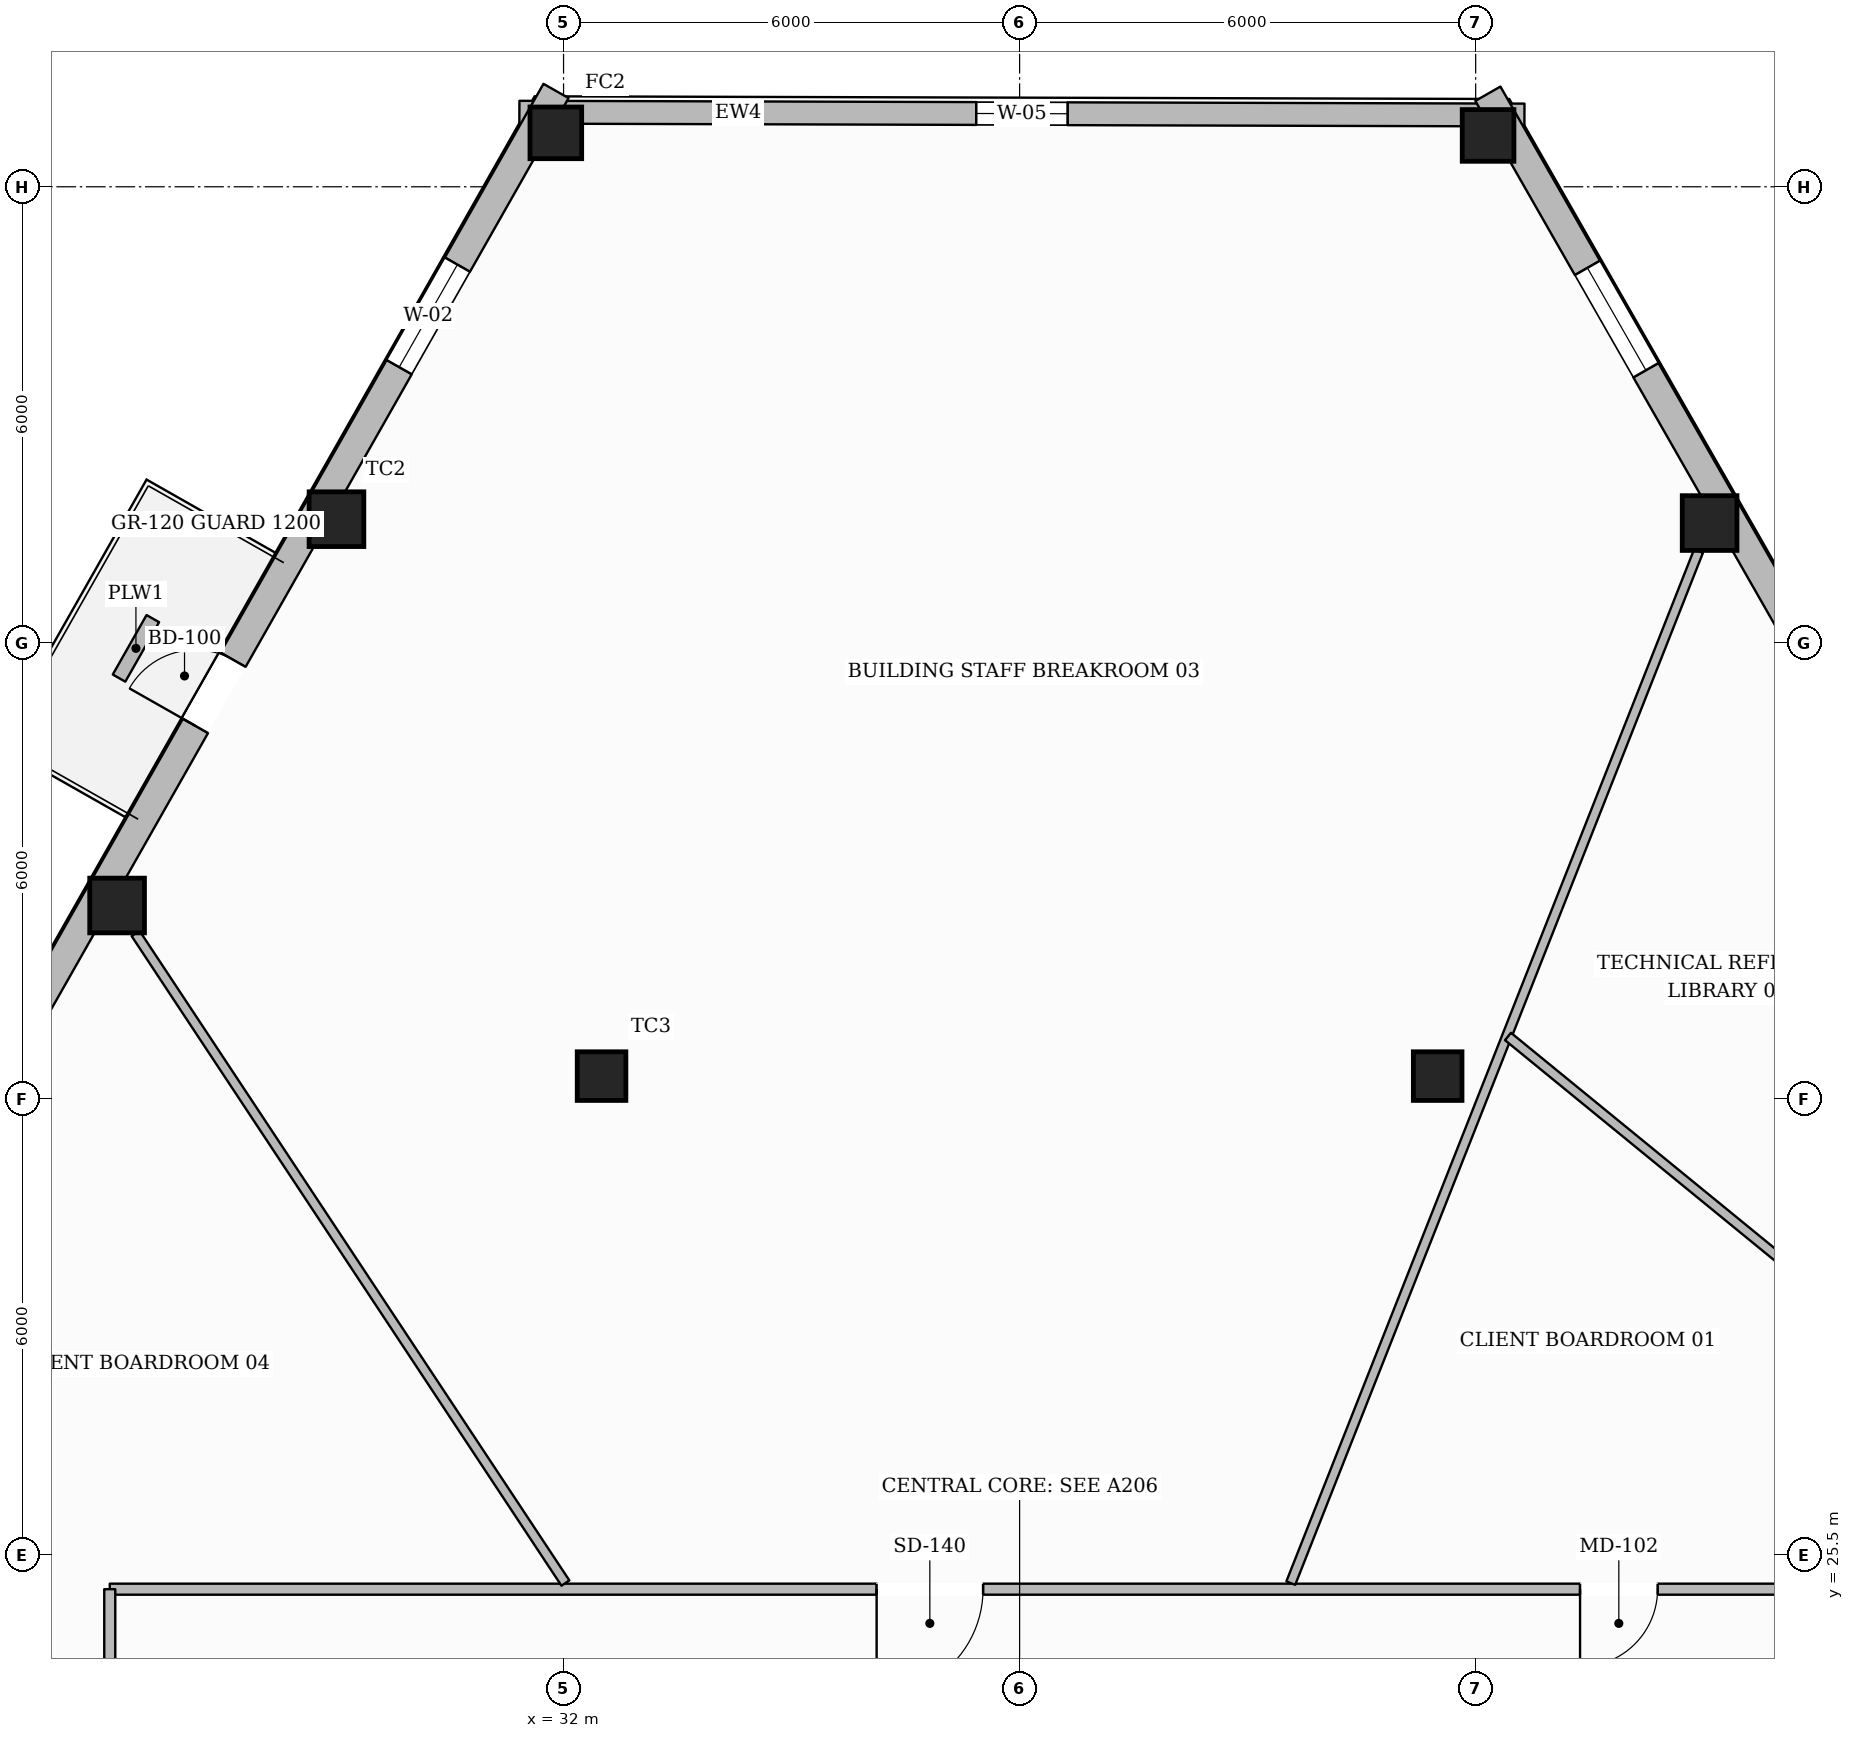
"""IFC4 building model, lengths in metres.
Left out: names, types, materials, properties, quantities, classifications, styles, units other than length and angle.
Written with IfcOpenShell. Run it as: python <this file> out.ifc"""

import sys

from ifc_helpers import new_model, si_unit, direction, frame, frame_2d, origin, origin_2d, place, context, subcontext, project, spatial, rectangle, hollow_rectangle, extrude, element, fill, save


model = new_model("IFC4")
c1 = context("Model", 3, precision=1e-05, world=origin(), true_north=direction((0.0, 1.0)))
c2 = subcontext(c1, "Body", "Model", "MODEL_VIEW")
j1 = project(units=[si_unit("LENGTHUNIT", "METRE"), si_unit("PLANEANGLEUNIT", "RADIAN")], contexts=[c1])
p1 = place(None, origin())
s1 = spatial("IfcSite", under=j1, at=p1, CompositionType="ELEMENT")
p2 = place(p1, origin())
s2 = spatial("IfcBuilding", under=s1, at=p2, CompositionType="ELEMENT")
p3 = place(p2, frame((0.0, 0.0, 97.05)))
s3 = spatial("IfcBuildingStorey", under=s2, at=p3, CompositionType="ELEMENT", Elevation=97.05)
p4 = place(p3, frame((31.899, 44.209, 0.0), z_axis=(0.0, 0.0, 1.0), x_axis=(1.0, 0.0, 0.0)))
e1 = element("IfcColumn", 1, at=p4, inside=s3, PredefinedType="COLUMN", context=c2, shape_type="SweptSolid", body=[
    extrude(hollow_rectangle(XDim=0.68, YDim=0.68, WallThickness=0.03, at=origin_2d()), origin(), (0.0, 0.0, 1.0), 3.6),
])
for number, where, z_axis, x_axis in (
    (2, (29.012, 39.127, 0.0), (0.0, 0.0, 1.0), (1.0, 0.0, 0.0)),
    (3, (26.126, 34.044, 0.0), (0.0, 0.0, 1.0), (1.0, 0.0, 0.0)),
    (4, (47.078, 39.076, 0.0), (0.0, 0.0, 1.0), (1.0, 0.0, 0.0)),
):
    element("IfcColumn", number, at=place(p3, frame(where, z_axis=z_axis, x_axis=x_axis)), inside=s3, PredefinedType="COLUMN", context=c2, shape_type="SweptSolid", body=[
        extrude(hollow_rectangle(XDim=0.72, YDim=0.72, WallThickness=0.032, at=origin_2d()), origin(), (0.0, 0.0, 1.0), 3.6),
    ])
p5 = place(p3, frame((44.163, 44.175, 0.0), z_axis=(0.0, 0.0, 1.0), x_axis=(1.0, 0.0, 0.0)))
e5 = element("IfcColumn", 5, at=p5, inside=s3, PredefinedType="COLUMN", context=c2, shape_type="SweptSolid", body=[
    extrude(hollow_rectangle(XDim=0.68, YDim=0.68, WallThickness=0.03, at=origin_2d()), origin(), (0.0, 0.0, 1.0), 3.6),
])
for number, where, z_axis, x_axis in (
    (6, (32.5, 31.8, 0.0), (0.0, 0.0, 1.0), (1.0, 0.0, 0.0)),
    (7, (43.5, 31.8, 0.0), (0.0, 0.0, 1.0), (1.0, 0.0, 0.0)),
):
    element("IfcColumn", number, at=place(p3, frame(where, z_axis=z_axis, x_axis=x_axis)), inside=s3, PredefinedType="COLUMN", context=c2, shape_type="SweptSolid", body=[
        extrude(hollow_rectangle(XDim=0.64, YDim=0.64, WallThickness=0.028, at=origin_2d()), origin(), (0.0, 0.0, 1.0), 3.6),
    ])
p6 = place(p3, frame((31.419, 44.481, 0.0), z_axis=(0.0, 0.0, 1.0), x_axis=(0.999996113452, -0.002788024615, 0.0)))
e8 = element("IfcWall", 8, at=p6, inside=s3, PredefinedType="STANDARD", context=c2, shape_type="SweptSolid", body=[
    extrude(rectangle(XDim=13.223, YDim=0.3, at=frame_2d((6.611, 0.0))), origin(), (0.0, 0.0, 1.0), 3.059),
])
p7 = place(p6, frame((6.011, 0.0, 0.65)))
e9 = element("IfcOpeningElement", 9, at=p7, cuts=e8, PredefinedType="OPENING", context=c2, shape_type="SweptSolid", body=[
    extrude(rectangle(XDim=1.2, YDim=1.7, at=frame_2d((0.6, 0.85))), frame((0.0, 0.16, 0.0), z_axis=(0.0, -1.0, 0.0), x_axis=(1.0, 0.0, 0.0)), (0.0, 0.0, 1.0), 0.32),
])
p8 = place(p3, frame((14.113, 13.436, 0.0), z_axis=(0.0, 0.0, 1.0), x_axis=(0.493785476093, 0.869583753068, 0.0)))
e10 = element("IfcWall", 10, at=p8, inside=s3, PredefinedType="STANDARD", context=c2, shape_type="SweptSolid", body=[
    extrude(rectangle(XDim=36.023, YDim=0.38, at=frame_2d((18.011, 0.0))), origin(), (0.0, 0.0, 1.0), 3.059),
])
p9 = place(p8, frame((26.417, 0.0, 0.0)))
e11 = element("IfcOpeningElement", 11, at=p9, cuts=e10, PredefinedType="OPENING", context=c2, shape_type="SweptSolid", body=[
    extrude(rectangle(XDim=1.0, YDim=2.2, at=frame_2d((0.5, 1.1))), frame((0.0, 0.2, 0.0), z_axis=(0.0, -1.0, 0.0), x_axis=(1.0, 0.0, 0.0)), (0.0, 0.0, 1.0), 0.4),
])
p10 = place(p8, frame((31.845, 0.0, 0.65)))
e12 = element("IfcOpeningElement", 12, at=p10, cuts=e10, PredefinedType="OPENING", context=c2, shape_type="SweptSolid", body=[
    extrude(rectangle(XDim=1.55, YDim=1.75, at=frame_2d((0.775, 0.875))), frame((0.0, 0.2, 0.0), z_axis=(0.0, -1.0, 0.0), x_axis=(1.0, 0.0, 0.0)), (0.0, 0.0, 1.0), 0.4),
])
p11 = place(p8, frame((20.156, 0.0, 0.65)))
e13 = element("IfcOpeningElement", 13, at=p11, cuts=e10, PredefinedType="OPENING", context=c2, shape_type="SweptSolid", body=[
    extrude(rectangle(XDim=1.55, YDim=1.75, at=frame_2d((0.775, 0.875))), frame((0.0, 0.2, 0.0), z_axis=(0.0, -1.0, 0.0), x_axis=(1.0, 0.0, 0.0)), (0.0, 0.0, 1.0), 0.4),
])
p12 = place(p8, frame((8.466, 0.0, 0.65)))
e14 = element("IfcOpeningElement", 14, at=p12, cuts=e10, PredefinedType="OPENING", context=c2, shape_type="SweptSolid", body=[
    extrude(rectangle(XDim=1.55, YDim=1.75, at=frame_2d((0.775, 0.875))), frame((0.0, 0.2, 0.0), z_axis=(0.0, -1.0, 0.0), x_axis=(1.0, 0.0, 0.0)), (0.0, 0.0, 1.0), 0.4),
])
p13 = place(p8, frame((2.621, 0.0, 0.65)))
e15 = element("IfcOpeningElement", 15, at=p13, cuts=e10, PredefinedType="OPENING", context=c2, shape_type="SweptSolid", body=[
    extrude(rectangle(XDim=1.55, YDim=1.75, at=frame_2d((0.775, 0.875))), frame((0.0, 0.2, 0.0), z_axis=(0.0, -1.0, 0.0), x_axis=(1.0, 0.0, 0.0)), (0.0, 0.0, 1.0), 0.4),
])
p14 = place(p3, frame((44.161, 44.724, 0.0), z_axis=(0.0, 0.0, 1.0), x_axis=(0.496205042728, -0.86820536486, 0.0)))
e16 = element("IfcWall", 16, at=p14, inside=s3, PredefinedType="STANDARD", context=c2, shape_type="SweptSolid", body=[
    extrude(rectangle(XDim=36.193, YDim=0.38, at=frame_2d((18.097, 0.0))), origin(), (0.0, 0.0, 1.0), 3.059),
])
p15 = place(p14, frame((32.008, 0.0, 0.65)))
e17 = element("IfcOpeningElement", 17, at=p15, cuts=e16, PredefinedType="OPENING", context=c2, shape_type="SweptSolid", body=[
    extrude(rectangle(XDim=1.55, YDim=1.75, at=frame_2d((0.775, 0.875))), frame((0.0, 0.2, 0.0), z_axis=(0.0, -1.0, 0.0), x_axis=(1.0, 0.0, 0.0)), (0.0, 0.0, 1.0), 0.4),
])
p16 = place(p14, frame((26.134, 0.0, 0.65)))
e18 = element("IfcOpeningElement", 18, at=p16, cuts=e16, PredefinedType="OPENING", context=c2, shape_type="SweptSolid", body=[
    extrude(rectangle(XDim=1.55, YDim=1.75, at=frame_2d((0.775, 0.875))), frame((0.0, 0.2, 0.0), z_axis=(0.0, -1.0, 0.0), x_axis=(1.0, 0.0, 0.0)), (0.0, 0.0, 1.0), 0.4),
])
p17 = place(p14, frame((20.26, 0.0, 0.65)))
e19 = element("IfcOpeningElement", 19, at=p17, cuts=e16, PredefinedType="OPENING", context=c2, shape_type="SweptSolid", body=[
    extrude(rectangle(XDim=1.55, YDim=1.75, at=frame_2d((0.775, 0.875))), frame((0.0, 0.2, 0.0), z_axis=(0.0, -1.0, 0.0), x_axis=(1.0, 0.0, 0.0)), (0.0, 0.0, 1.0), 0.4),
])
p18 = place(p14, frame((8.513, 0.0, 0.65)))
e20 = element("IfcOpeningElement", 20, at=p18, cuts=e16, PredefinedType="OPENING", context=c2, shape_type="SweptSolid", body=[
    extrude(rectangle(XDim=1.55, YDim=1.75, at=frame_2d((0.775, 0.875))), frame((0.0, 0.2, 0.0), z_axis=(0.0, -1.0, 0.0), x_axis=(1.0, 0.0, 0.0)), (0.0, 0.0, 1.0), 0.4),
])
p19 = place(p14, frame((2.639, 0.0, 0.65)))
e21 = element("IfcOpeningElement", 21, at=p19, cuts=e16, PredefinedType="OPENING", context=c2, shape_type="SweptSolid", body=[
    extrude(rectangle(XDim=1.55, YDim=1.75, at=frame_2d((0.775, 0.875))), frame((0.0, 0.2, 0.0), z_axis=(0.0, -1.0, 0.0), x_axis=(1.0, 0.0, 0.0)), (0.0, 0.0, 1.0), 0.4),
])
p20 = place(p3, frame((26.596, 37.819, 0.0), z_axis=(0.0, 0.0, 1.0), x_axis=(-0.493799627288, -0.869575717284, 0.0)))
e22 = element("IfcWall", 22, at=p20, inside=s3, PredefinedType="USERDEFINED", context=c2, shape_type="SweptSolid", body=[
    extrude(rectangle(XDim=0.9, YDim=0.19, at=frame_2d((0.45, 0.0))), origin(), (0.0, 0.0, 1.0), 0.5),
])
p21 = place(p3, frame((49.97, 25.05, 0.0), z_axis=(0.0, 0.0, 1.0), x_axis=(-1.0, 0.0, 0.0)))
e23 = element("IfcWall", 23, at=p21, inside=s3, PredefinedType="PARTITIONING", context=c2, shape_type="SweptSolid", body=[
    extrude(rectangle(XDim=23.94, YDim=0.145, at=frame_2d((11.97, 0.0))), origin(), (0.0, 0.0, 1.0), 3.6),
])
p22 = place(p21, frame((3.577, 0.0, 0.0)))
e24 = element("IfcOpeningElement", 24, at=p22, cuts=e23, PredefinedType="OPENING", context=c2, shape_type="SweptSolid", body=[
    extrude(rectangle(XDim=1.02, YDim=2.15, at=frame_2d((0.51, 1.075))), frame((0.0, 0.083, 0.0), z_axis=(0.0, -1.0, 0.0), x_axis=(1.0, 0.0, 0.0)), (0.0, 0.0, 1.0), 0.165),
])
p23 = place(p21, frame((12.451, 0.0, 0.0)))
e25 = element("IfcOpeningElement", 25, at=p23, cuts=e23, PredefinedType="OPENING", context=c2, shape_type="SweptSolid", body=[
    extrude(rectangle(XDim=1.4, YDim=2.2, at=frame_2d((0.7, 1.1))), frame((0.0, 0.083, 0.0), z_axis=(0.0, -1.0, 0.0), x_axis=(1.0, 0.0, 0.0)), (0.0, 0.0, 1.0), 0.165),
])
p24 = place(p3, frame((26.03, 25.05, 0.0), z_axis=(0.0, 0.0, 1.0), x_axis=(0.0, -1.0, 0.0)))
e26 = element("IfcWall", 26, at=p24, inside=s3, PredefinedType="PARTITIONING", context=c2, shape_type="SweptSolid", body=[
    extrude(rectangle(XDim=17.9, YDim=0.145, at=frame_2d((8.95, 0.0))), origin(), (0.0, 0.0, 1.0), 3.288),
])
p25 = place(p24, frame((3.259, 0.0, 0.0)))
e27 = element("IfcOpeningElement", 27, at=p25, cuts=e26, PredefinedType="OPENING", context=c2, shape_type="SweptSolid", body=[
    extrude(rectangle(XDim=1.02, YDim=2.15, at=frame_2d((0.51, 1.075))), frame((0.0, 0.083, 0.0), z_axis=(0.0, -1.0, 0.0), x_axis=(1.0, 0.0, 0.0)), (0.0, 0.0, 1.0), 0.165),
])
p26 = place(p24, frame((12.038, 0.0, 0.0)))
e28 = element("IfcOpeningElement", 28, at=p26, cuts=e26, PredefinedType="OPENING", context=c2, shape_type="SweptSolid", body=[
    extrude(rectangle(XDim=1.02, YDim=2.15, at=frame_2d((0.51, 1.075))), frame((0.0, 0.083, 0.0), z_axis=(0.0, -1.0, 0.0), x_axis=(1.0, 0.0, 0.0)), (0.0, 0.0, 1.0), 0.165),
])
p27 = place(p3, frame((41.568, 25.131, 0.0), z_axis=(0.0, 0.0, 1.0), x_axis=(0.36746312835, 0.930038090243, 0.0)))
e29 = element("IfcWall", 29, at=p27, inside=s3, PredefinedType="PARTITIONING", context=c2, shape_type="SweptSolid", body=[
    extrude(rectangle(XDim=14.599, YDim=0.125, at=frame_2d((7.299, 0.0))), origin(), (0.0, 0.0, 1.0), 3.141),
])
p28 = place(p3, frame((32.025, 25.131, 0.0), z_axis=(0.0, 0.0, 1.0), x_axis=(-0.55183790472, 0.833951393616, 0.0)))
e30 = element("IfcWall", 30, at=p28, inside=s3, PredefinedType="PARTITIONING", context=c2, shape_type="SweptSolid", body=[
    extrude(rectangle(XDim=10.247, YDim=0.125, at=frame_2d((5.124, 0.0))), origin(), (0.0, 0.0, 1.0), 3.6),
])
p29 = place(p3, frame((55.191, 23.522, 0.0), z_axis=(0.0, 0.0, 1.0), x_axis=(-0.774294364682, 0.632825597476, 0.0)))
e31 = element("IfcWall", 31, at=p29, inside=s3, PredefinedType="PARTITIONING", context=c2, shape_type="SweptSolid", body=[
    extrude(rectangle(XDim=13.905, YDim=0.125, at=frame_2d((6.952, 0.0))), origin(), (0.0, 0.0, 1.0), 3.288),
])
p30 = place(p29, frame((6.47, 0.0, 0.0)))
e32 = element("IfcOpeningElement", 32, at=p30, cuts=e31, PredefinedType="OPENING", context=c2, shape_type="SweptSolid", body=[
    extrude(rectangle(XDim=0.98, YDim=2.15, at=frame_2d((0.49, 1.075))), frame((0.0, 0.073, 0.0), z_axis=(0.0, -1.0, 0.0), x_axis=(1.0, 0.0, 0.0)), (0.0, 0.0, 1.0), 0.145),
])
p31 = place(p9, origin())
e33 = element("IfcDoor", 33, at=p31, inside=s3, OperationType="SINGLE_SWING_LEFT", PredefinedType="DOOR", context=c2, shape_type="SweptSolid", body=[
    extrude(rectangle(XDim=1.0, YDim=2.2, at=frame_2d((0.5, 1.1))), frame((0.0, 0.025, 0.0), z_axis=(0.0, -1.0, 0.0), x_axis=(1.0, 0.0, 0.0)), (0.0, 0.0, 1.0), 0.05),
])
fill(e11, e33)
p32 = place(p10, origin())
e34 = element("IfcWindow", 34, at=p32, inside=s3, PartitioningType="SINGLE_PANEL", PredefinedType="WINDOW", context=c2, shape_type="SweptSolid", body=[
    extrude(rectangle(XDim=1.55, YDim=1.75, at=frame_2d((0.775, 0.875))), frame((0.0, 0.03, 0.0), z_axis=(0.0, -1.0, 0.0), x_axis=(1.0, 0.0, 0.0)), (0.0, 0.0, 1.0), 0.06),
])
fill(e12, e34)
p33 = place(p19, origin())
e35 = element("IfcWindow", 35, at=p33, inside=s3, PartitioningType="SINGLE_PANEL", PredefinedType="WINDOW", context=c2, shape_type="SweptSolid", body=[
    extrude(rectangle(XDim=1.55, YDim=1.75, at=frame_2d((0.775, 0.875))), frame((0.0, 0.03, 0.0), z_axis=(0.0, -1.0, 0.0), x_axis=(1.0, 0.0, 0.0)), (0.0, 0.0, 1.0), 0.06),
])
fill(e21, e35)
p34 = place(p7, origin())
e36 = element("IfcWindow", 36, at=p34, inside=s3, PartitioningType="SINGLE_PANEL", PredefinedType="WINDOW", context=c2, shape_type="SweptSolid", body=[
    extrude(rectangle(XDim=1.2, YDim=1.7, at=frame_2d((0.6, 0.85))), frame((0.0, 0.03, 0.0), z_axis=(0.0, -1.0, 0.0), x_axis=(1.0, 0.0, 0.0)), (0.0, 0.0, 1.0), 0.06),
])
fill(e9, e36)
p35 = place(p22, origin())
e37 = element("IfcDoor", 37, at=p35, inside=s3, OperationType="SINGLE_SWING_RIGHT", PredefinedType="DOOR", context=c2, shape_type="SweptSolid", body=[
    extrude(rectangle(XDim=1.02, YDim=2.15, at=frame_2d((0.51, 1.075))), frame((0.0, 0.025, 0.0), z_axis=(0.0, -1.0, 0.0), x_axis=(1.0, 0.0, 0.0)), (0.0, 0.0, 1.0), 0.05),
])
fill(e24, e37)
p36 = place(p23, origin())
e38 = element("IfcDoor", 38, at=p36, inside=s3, OperationType="SINGLE_SWING_RIGHT", PredefinedType="DOOR", context=c2, shape_type="SweptSolid", body=[
    extrude(rectangle(XDim=1.4, YDim=2.2, at=frame_2d((0.7, 1.1))), frame((0.0, 0.025, 0.0), z_axis=(0.0, -1.0, 0.0), x_axis=(1.0, 0.0, 0.0)), (0.0, 0.0, 1.0), 0.05),
])
fill(e25, e38)
save(model, sys.argv[1])
